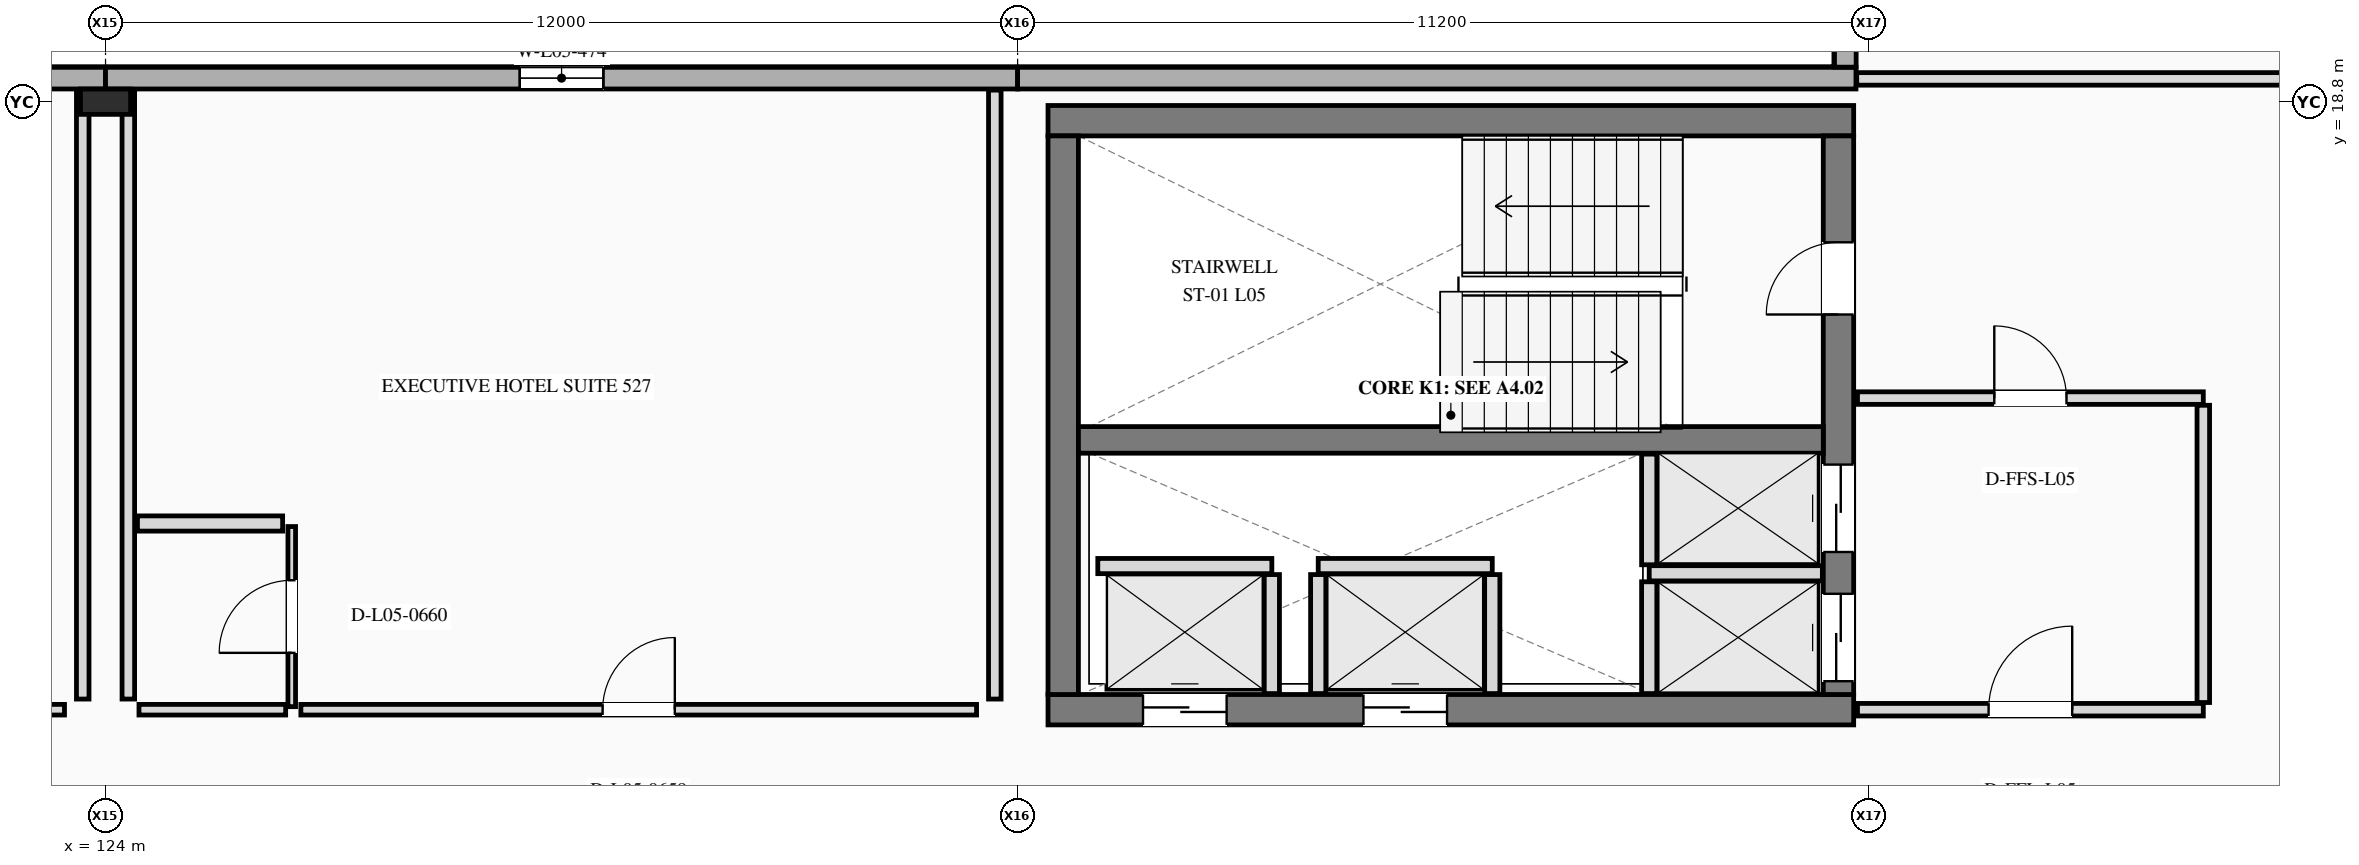
"""IFC4 building model, lengths in metres.
Left out: names, types, materials, properties, quantities, classifications, styles, units other than length and angle.
Written with IfcOpenShell. Run it as: python <this file> out.ifc"""

import sys

from ifc_helpers import new_model, si_unit, direction, frame, frame_2d, origin, origin_2d, place, context, subcontext, project, spatial, rectangle, i_section, extrude, element, fill, save


model = new_model("IFC4")
c1 = context("Model", 3, precision=1e-05, world=origin(), true_north=direction((0.0, 1.0)))
c2 = subcontext(c1, "Body", "Model", "MODEL_VIEW")
j1 = project(units=[si_unit("LENGTHUNIT", "METRE"), si_unit("PLANEANGLEUNIT", "RADIAN")], contexts=[c1])
p1 = place(None, origin())
s1 = spatial("IfcSite", under=j1, at=p1, CompositionType="ELEMENT")
p2 = place(p1, origin())
s2 = spatial("IfcBuilding", under=s1, at=p2, CompositionType="ELEMENT")
p3 = place(p2, frame((0.0, 0.0, 23.4)))
s3 = spatial("IfcBuildingStorey", under=s2, at=p3, CompositionType="ELEMENT", Elevation=23.4)
p4 = place(p3, frame((124.0, 18.8, 0.0), z_axis=(0.0, 0.0, 1.0), x_axis=(0.0, 1.0, 0.0)))
e1 = element("IfcColumn", 1, at=p4, inside=s3, PredefinedType="COLUMN", context=c2, shape_type="SweptSolid", body=[
    extrude(i_section(OverallWidth=0.333, OverallDepth=0.66, WebThickness=0.024, FlangeThickness=0.044, at=origin_2d()), origin(), (0.0, 0.0, 1.0), 3.6),
])
p5 = place(p3, frame((124.0, 19.11, 0.0), z_axis=(0.0, 0.0, 1.0), x_axis=(-1.0, 0.0, 0.0)))
e2 = element("IfcWall", 2, at=p5, inside=s3, PredefinedType="STANDARD", context=c2, shape_type="SweptSolid", body=[
    extrude(rectangle(XDim=12.0, YDim=0.285, at=frame_2d((6.0, 0.0))), origin(), (0.0, 0.0, 1.0), 3.6),
])
p6 = place(p5, frame((8.175, 0.0, 0.85)))
e3 = element("IfcOpeningElement", 3, at=p6, cuts=e2, PredefinedType="OPENING", context=c2, shape_type="SweptSolid", body=[
    extrude(rectangle(XDim=1.35, YDim=1.65, at=frame_2d((0.675, 0.825))), frame((0.0, 0.152, 0.0), z_axis=(0.0, -1.0, 0.0), x_axis=(1.0, 0.0, 0.0)), (0.0, 0.0, 1.0), 0.305),
])
p7 = place(p5, frame((2.55, 0.0, 0.85)))
e4 = element("IfcOpeningElement", 4, at=p7, cuts=e2, PredefinedType="OPENING", context=c2, shape_type="SweptSolid", body=[
    extrude(rectangle(XDim=1.2, YDim=1.6, at=frame_2d((0.6, 0.8))), frame((0.0, 0.152, 0.0), z_axis=(0.0, -1.0, 0.0), x_axis=(1.0, 0.0, 0.0)), (0.0, 0.0, 1.0), 0.305),
])
p8 = place(p3, frame((136.0, 19.11, 0.0), z_axis=(0.0, 0.0, 1.0), x_axis=(-1.0, 0.0, 0.0)))
e5 = element("IfcWall", 5, at=p8, inside=s3, PredefinedType="STANDARD", context=c2, shape_type="SweptSolid", body=[
    extrude(rectangle(XDim=12.0, YDim=0.285, at=frame_2d((6.0, 0.0))), origin(), (0.0, 0.0, 1.0), 3.6),
])
p9 = place(p8, frame((5.45, 0.0, 0.85)))
e6 = element("IfcOpeningElement", 6, at=p9, cuts=e5, PredefinedType="OPENING", context=c2, shape_type="SweptSolid", body=[
    extrude(rectangle(XDim=1.1, YDim=1.5, at=frame_2d((0.55, 0.75))), frame((0.0, 0.152, 0.0), z_axis=(0.0, -1.0, 0.0), x_axis=(1.0, 0.0, 0.0)), (0.0, 0.0, 1.0), 0.305),
])
p10 = place(p3, frame((147.03, 19.11, 0.0), z_axis=(0.0, 0.0, 1.0), x_axis=(-1.0, 0.0, 0.0)))
e7 = element("IfcWall", 7, at=p10, inside=s3, PredefinedType="STANDARD", context=c2, shape_type="SweptSolid", body=[
    extrude(rectangle(XDim=11.03, YDim=0.285, at=frame_2d((5.515, 0.0))), origin(), (0.0, 0.0, 1.0), 3.6),
])
p11 = place(p3, frame((146.89, 19.254, 0.0), z_axis=(0.0, 0.0, 1.0), x_axis=(0.0, 1.0, 0.0)))
e8 = element("IfcWall", 8, at=p11, inside=s3, PredefinedType="STANDARD", context=c2, shape_type="SweptSolid", body=[
    extrude(rectangle(XDim=5.546, YDim=0.285, at=frame_2d((2.773, 0.0))), origin(), (0.0, 0.0, 1.0), 3.6),
])
p12 = place(p11, frame((1.698, 0.0, 0.85)))
e9 = element("IfcOpeningElement", 9, at=p12, cuts=e8, PredefinedType="OPENING", context=c2, shape_type="SweptSolid", body=[
    extrude(rectangle(XDim=1.8, YDim=1.8, at=frame_2d((0.9, 0.9))), frame((0.0, 0.152, 0.0), z_axis=(0.0, -1.0, 0.0), x_axis=(1.0, 0.0, 0.0)), (0.0, 0.0, 1.0), 0.305),
])
p13 = place(p3, frame((136.4, 10.8, 0.0), z_axis=(0.0, 0.0, 1.0), x_axis=(1.0, 0.0, 0.0)))
e10 = element("IfcWall", 10, at=p13, inside=s3, PredefinedType="SHEAR", context=c2, shape_type="SweptSolid", body=[
    extrude(rectangle(XDim=10.6, YDim=0.4, at=frame_2d((5.3, 0.0))), origin(), (0.0, 0.0, 1.0), 3.6),
])
p14 = place(p13, frame((1.25, 0.0, 0.0)))
e11 = element("IfcOpeningElement", 11, at=p14, cuts=e10, PredefinedType="OPENING", context=c2, shape_type="SweptSolid", body=[
    extrude(rectangle(XDim=1.1, YDim=2.2, at=frame_2d((0.55, 1.1))), frame((0.0, 0.21, 0.0), z_axis=(0.0, -1.0, 0.0), x_axis=(1.0, 0.0, 0.0)), (0.0, 0.0, 1.0), 0.42),
])
p15 = place(p13, frame((4.15, 0.0, 0.0)))
e12 = element("IfcOpeningElement", 12, at=p15, cuts=e10, PredefinedType="OPENING", context=c2, shape_type="SweptSolid", body=[
    extrude(rectangle(XDim=1.1, YDim=2.2, at=frame_2d((0.55, 1.1))), frame((0.0, 0.21, 0.0), z_axis=(0.0, -1.0, 0.0), x_axis=(1.0, 0.0, 0.0)), (0.0, 0.0, 1.0), 0.42),
])
p16 = place(p3, frame((147.0, 18.55, 0.0), z_axis=(0.0, 0.0, 1.0), x_axis=(-1.0, 0.0, 0.0)))
e13 = element("IfcWall", 13, at=p16, inside=s3, PredefinedType="SHEAR", context=c2, shape_type="SweptSolid", body=[
    extrude(rectangle(XDim=10.6, YDim=0.4, at=frame_2d((5.3, 0.0))), origin(), (0.0, 0.0, 1.0), 3.6),
])
p17 = place(p3, frame((136.6, 18.35, 0.0), z_axis=(0.0, 0.0, 1.0), x_axis=(0.0, -1.0, 0.0)))
e14 = element("IfcWall", 14, at=p17, inside=s3, PredefinedType="SHEAR", context=c2, shape_type="SweptSolid", body=[
    extrude(rectangle(XDim=7.35, YDim=0.4, at=frame_2d((3.675, 0.0))), origin(), (0.0, 0.0, 1.0), 3.6),
])
p18 = place(p3, frame((146.8, 11.0, 0.0), z_axis=(0.0, 0.0, 1.0), x_axis=(0.0, 1.0, 0.0)))
e15 = element("IfcWall", 15, at=p18, inside=s3, PredefinedType="SHEAR", context=c2, shape_type="SweptSolid", body=[
    extrude(rectangle(XDim=7.35, YDim=0.4, at=frame_2d((3.675, 0.0))), origin(), (0.0, 0.0, 1.0), 3.6),
])
p19 = place(p18, frame((5.0, 0.0, 0.0)))
e16 = element("IfcOpeningElement", 16, at=p19, cuts=e15, PredefinedType="OPENING", context=c2, shape_type="SweptSolid", body=[
    extrude(rectangle(XDim=0.95, YDim=2.2, at=frame_2d((0.475, 1.1))), frame((0.0, 0.21, 0.0), z_axis=(0.0, -1.0, 0.0), x_axis=(1.0, 0.0, 0.0)), (0.0, 0.0, 1.0), 0.42),
])
p20 = place(p18, frame((0.175, 0.0, 0.0)))
e17 = element("IfcOpeningElement", 17, at=p20, cuts=e15, PredefinedType="OPENING", context=c2, shape_type="SweptSolid", body=[
    extrude(rectangle(XDim=1.15, YDim=2.25, at=frame_2d((0.575, 1.125))), frame((0.0, 0.21, 0.0), z_axis=(0.0, -1.0, 0.0), x_axis=(1.0, 0.0, 0.0)), (0.0, 0.0, 1.0), 0.42),
])
p21 = place(p18, frame((1.875, 0.0, 0.0)))
e18 = element("IfcOpeningElement", 18, at=p21, cuts=e15, PredefinedType="OPENING", context=c2, shape_type="SweptSolid", body=[
    extrude(rectangle(XDim=1.15, YDim=2.25, at=frame_2d((0.575, 1.125))), frame((0.0, 0.21, 0.0), z_axis=(0.0, -1.0, 0.0), x_axis=(1.0, 0.0, 0.0)), (0.0, 0.0, 1.0), 0.42),
])
p22 = place(p3, frame((136.8, 14.35, 0.0), z_axis=(0.0, 0.0, 1.0), x_axis=(1.0, 0.0, 0.0)))
e19 = element("IfcWall", 19, at=p22, inside=s3, PredefinedType="SHEAR", context=c2, shape_type="SweptSolid", body=[
    extrude(rectangle(XDim=9.8, YDim=0.35, at=frame_2d((4.9, 0.0))), origin(), (0.0, 0.0, 1.0), 3.6),
])
p23 = place(p3, frame((137.055, 12.69, 0.0), z_axis=(0.0, 0.0, 1.0), x_axis=(1.0, 0.0, 0.0)))
e20 = element("IfcWall", 20, at=p23, inside=s3, PredefinedType="PLUMBINGWALL", context=c2, shape_type="SweptSolid", body=[
    extrude(rectangle(XDim=2.29, YDim=0.2, at=frame_2d((1.145, 0.0))), origin(), (0.0, 0.0, 1.0), 3.3),
])
p24 = place(p3, frame((139.345, 11.012, 0.0), z_axis=(0.0, 0.0, 1.0), x_axis=(0.0, 1.0, 0.0)))
e21 = element("IfcWall", 21, at=p24, inside=s3, PredefinedType="PLUMBINGWALL", context=c2, shape_type="SweptSolid", body=[
    extrude(rectangle(XDim=1.566, YDim=0.2, at=frame_2d((0.783, 0.0))), origin(), (0.0, 0.0, 1.0), 3.3),
])
p25 = place(p3, frame((139.955, 12.69, 0.0), z_axis=(0.0, 0.0, 1.0), x_axis=(1.0, 0.0, 0.0)))
e22 = element("IfcWall", 22, at=p25, inside=s3, PredefinedType="PLUMBINGWALL", context=c2, shape_type="SweptSolid", body=[
    extrude(rectangle(XDim=2.29, YDim=0.2, at=frame_2d((1.145, 0.0))), origin(), (0.0, 0.0, 1.0), 3.3),
])
for number, where, z_axis, x_axis in (
    (23, (139.955, 11.012, 0.0), (0.0, 0.0, 1.0), (0.0, 1.0, 0.0)),
    (24, (142.245, 11.012, 0.0), (0.0, 0.0, 1.0), (0.0, 1.0, 0.0)),
):
    element("IfcWall", number, at=place(p3, frame(where, z_axis=z_axis, x_axis=x_axis)), inside=s3, PredefinedType="PLUMBINGWALL", context=c2, shape_type="SweptSolid", body=[
        extrude(rectangle(XDim=1.566, YDim=0.2, at=frame_2d((0.783, 0.0))), origin(), (0.0, 0.0, 1.0), 3.3),
    ])
p26 = place(p3, frame((144.31, 12.595, 0.0), z_axis=(0.0, 0.0, 1.0), x_axis=(1.0, 0.0, 0.0)))
e25 = element("IfcWall", 25, at=p26, inside=s3, PredefinedType="PLUMBINGWALL", context=c2, shape_type="SweptSolid", body=[
    extrude(rectangle(XDim=2.278, YDim=0.2, at=frame_2d((1.139, 0.0))), origin(), (0.0, 0.0, 1.0), 3.3),
])
p27 = place(p3, frame((144.31, 11.012, 0.0), z_axis=(0.0, 0.0, 1.0), x_axis=(0.0, 1.0, 0.0)))
e26 = element("IfcWall", 26, at=p27, inside=s3, PredefinedType="PLUMBINGWALL", context=c2, shape_type="SweptSolid", body=[
    extrude(rectangle(XDim=1.471, YDim=0.2, at=frame_2d((0.735, 0.0))), origin(), (0.0, 0.0, 1.0), 3.3),
])
p28 = place(p3, frame((144.31, 12.707, 0.0), z_axis=(0.0, 0.0, 1.0), x_axis=(0.0, 1.0, 0.0)))
e27 = element("IfcWall", 27, at=p28, inside=s3, PredefinedType="PLUMBINGWALL", context=c2, shape_type="SweptSolid", body=[
    extrude(rectangle(XDim=1.456, YDim=0.2, at=frame_2d((0.728, 0.0))), origin(), (0.0, 0.0, 1.0), 3.3),
])
p29 = place(p3, frame((147.05, 10.8, 0.0), z_axis=(0.0, 0.0, 1.0), x_axis=(1.0, 0.0, 0.0)))
e28 = element("IfcWall", 28, at=p29, inside=s3, PredefinedType="PARTITIONING", context=c2, shape_type="SweptSolid", body=[
    extrude(rectangle(XDim=4.55, YDim=0.165, at=frame_2d((2.275, 0.0))), origin(), (0.0, 0.0, 1.0), 3.3),
])
p30 = place(p29, frame((1.725, 0.0, 0.0)))
e29 = element("IfcOpeningElement", 29, at=p30, cuts=e28, PredefinedType="OPENING", context=c2, shape_type="SweptSolid", body=[
    extrude(rectangle(XDim=1.1, YDim=2.2, at=frame_2d((0.55, 1.1))), frame((0.0, 0.093, 0.0), z_axis=(0.0, -1.0, 0.0), x_axis=(1.0, 0.0, 0.0)), (0.0, 0.0, 1.0), 0.185),
])
p31 = place(p3, frame((147.05, 14.9, 0.0), z_axis=(0.0, 0.0, 1.0), x_axis=(1.0, 0.0, 0.0)))
e30 = element("IfcWall", 30, at=p31, inside=s3, PredefinedType="PARTITIONING", context=c2, shape_type="SweptSolid", body=[
    extrude(rectangle(XDim=4.55, YDim=0.165, at=frame_2d((2.275, 0.0))), origin(), (0.0, 0.0, 1.0), 3.3),
])
p32 = place(p31, frame((1.8, 0.0, 0.0)))
e31 = element("IfcOpeningElement", 31, at=p32, cuts=e30, PredefinedType="OPENING", context=c2, shape_type="SweptSolid", body=[
    extrude(rectangle(XDim=0.95, YDim=2.2, at=frame_2d((0.475, 1.1))), frame((0.0, 0.093, 0.0), z_axis=(0.0, -1.0, 0.0), x_axis=(1.0, 0.0, 0.0)), (0.0, 0.0, 1.0), 0.185),
])
p33 = place(p3, frame((151.6, 10.895, 0.0), z_axis=(0.0, 0.0, 1.0), x_axis=(0.0, 1.0, 0.0)))
e32 = element("IfcWall", 32, at=p33, inside=s3, PredefinedType="PARTITIONING", context=c2, shape_type="SweptSolid", body=[
    extrude(rectangle(XDim=3.911, YDim=0.165, at=frame_2d((1.956, 0.0))), origin(), (0.0, 0.0, 1.0), 3.3),
])
p34 = place(p3, frame((120.27, 10.8, 0.0), z_axis=(0.0, 0.0, 1.0), x_axis=(1.0, 0.0, 0.0)))
e33 = element("IfcWall", 33, at=p34, inside=s3, PredefinedType="PARTITIONING", context=c2, shape_type="SweptSolid", body=[
    extrude(rectangle(XDim=3.19, YDim=0.14, at=frame_2d((1.595, 0.0))), origin(), (0.0, 0.0, 1.0), 3.3),
])
p35 = place(p34, frame((1.075, 0.0, 0.0)))
e34 = element("IfcOpeningElement", 34, at=p35, cuts=e33, PredefinedType="OPENING", context=c2, shape_type="SweptSolid", body=[
    extrude(rectangle(XDim=1.04, YDim=2.25, at=frame_2d((0.52, 1.125))), frame((0.0, 0.08, 0.0), z_axis=(0.0, -1.0, 0.0), x_axis=(1.0, 0.0, 0.0)), (0.0, 0.0, 1.0), 0.16),
])
p36 = place(p3, frame((123.7, 10.94, 0.0), z_axis=(0.0, 0.0, 1.0), x_axis=(0.0, 1.0, 0.0)))
e35 = element("IfcWall", 35, at=p36, inside=s3, PredefinedType="PARTITIONING", context=c2, shape_type="SweptSolid", body=[
    extrude(rectangle(XDim=8.012, YDim=0.165, at=frame_2d((4.006, 0.0))), origin(), (0.0, 0.0, 1.0), 2.538),
])
p37 = place(p3, frame((124.44, 10.8, 0.0), z_axis=(0.0, 0.0, 1.0), x_axis=(1.0, 0.0, 0.0)))
e36 = element("IfcWall", 36, at=p37, inside=s3, PredefinedType="PARTITIONING", context=c2, shape_type="SweptSolid", body=[
    extrude(rectangle(XDim=1.93, YDim=0.14, at=frame_2d((0.965, 0.0))), origin(), (0.0, 0.0, 1.0), 3.3),
])
p38 = place(p3, frame((126.57, 10.8, 0.0), z_axis=(0.0, 0.0, 1.0), x_axis=(1.0, 0.0, 0.0)))
e37 = element("IfcWall", 37, at=p38, inside=s3, PredefinedType="PARTITIONING", context=c2, shape_type="SweptSolid", body=[
    extrude(rectangle(XDim=8.89, YDim=0.14, at=frame_2d((4.445, 0.0))), origin(), (0.0, 0.0, 1.0), 3.3),
])
p39 = place(p38, frame((3.97, 0.0, 0.0)))
e38 = element("IfcOpeningElement", 38, at=p39, cuts=e37, PredefinedType="OPENING", context=c2, shape_type="SweptSolid", body=[
    extrude(rectangle(XDim=0.95, YDim=2.3, at=frame_2d((0.475, 1.15))), frame((0.0, 0.08, 0.0), z_axis=(0.0, -1.0, 0.0), x_axis=(1.0, 0.0, 0.0)), (0.0, 0.0, 1.0), 0.16),
])
p40 = place(p3, frame((124.3, 10.94, 0.0), z_axis=(0.0, 0.0, 1.0), x_axis=(0.0, 1.0, 0.0)))
e39 = element("IfcWall", 39, at=p40, inside=s3, PredefinedType="PARTITIONING", context=c2, shape_type="SweptSolid", body=[
    extrude(rectangle(XDim=8.012, YDim=0.165, at=frame_2d((4.006, 0.0))), origin(), (0.0, 0.0, 1.0), 2.629),
])
p41 = place(p3, frame((135.7, 10.94, 0.0), z_axis=(0.0, 0.0, 1.0), x_axis=(0.0, 1.0, 0.0)))
e40 = element("IfcWall", 40, at=p41, inside=s3, PredefinedType="PARTITIONING", context=c2, shape_type="SweptSolid", body=[
    extrude(rectangle(XDim=8.012, YDim=0.165, at=frame_2d((4.006, 0.0))), origin(), (0.0, 0.0, 1.0), 3.3),
])
p42 = place(p3, frame((126.45, 10.84, 0.0), z_axis=(0.0, 0.0, 1.0), x_axis=(0.0, 1.0, 0.0)))
e41 = element("IfcWall", 41, at=p42, inside=s3, PredefinedType="PARTITIONING", context=c2, shape_type="SweptSolid", body=[
    extrude(rectangle(XDim=2.37, YDim=0.1, at=frame_2d((1.185, 0.0))), origin(), (0.0, 0.0, 1.0), 3.3),
])
p43 = place(p42, frame((0.708, 0.0, 0.0)))
e42 = element("IfcOpeningElement", 42, at=p43, cuts=e41, PredefinedType="OPENING", context=c2, shape_type="SweptSolid", body=[
    extrude(rectangle(XDim=0.955, YDim=2.22, at=frame_2d((0.478, 1.11))), frame((0.0, 0.06, 0.0), z_axis=(0.0, -1.0, 0.0), x_axis=(1.0, 0.0, 0.0)), (0.0, 0.0, 1.0), 0.12),
])
p44 = place(p3, frame((124.42, 13.25, 0.0), z_axis=(0.0, 0.0, 1.0), x_axis=(1.0, 0.0, 0.0)))
e43 = element("IfcWall", 43, at=p44, inside=s3, PredefinedType="PLUMBINGWALL", context=c2, shape_type="SweptSolid", body=[
    extrude(rectangle(XDim=1.91, YDim=0.2, at=frame_2d((0.955, 0.0))), origin(), (0.0, 0.0, 1.0), 3.3),
])
p45 = place(p3, frame((147.04, 19.1, 0.0), z_axis=(0.0, 0.0, 1.0), x_axis=(1.0, 0.0, 0.0)))
e44 = element("IfcWall", 44, at=p45, inside=s3, PredefinedType="PARTITIONING", context=c2, shape_type="SweptSolid", body=[
    extrude(rectangle(XDim=8.22, YDim=0.165, at=frame_2d((4.11, 0.0))), origin(), (0.0, 0.0, 1.0), 3.3),
])
p46 = place(p9, origin())
e45 = element("IfcWindow", 45, at=p46, inside=s3, PartitioningType="SINGLE_PANEL", PredefinedType="WINDOW", context=c2, shape_type="SweptSolid", body=[
    extrude(rectangle(XDim=1.1, YDim=1.5, at=frame_2d((0.55, 0.75))), frame((0.0, 0.03, 0.0), z_axis=(0.0, -1.0, 0.0), x_axis=(1.0, 0.0, 0.0)), (0.0, 0.0, 1.0), 0.06),
])
fill(e6, e45)
p47 = place(p19, origin())
e46 = element("IfcDoor", 46, at=p47, inside=s3, OperationType="SINGLE_SWING_LEFT", PredefinedType="DOOR", context=c2, shape_type="SweptSolid", body=[
    extrude(rectangle(XDim=0.95, YDim=2.2, at=frame_2d((0.475, 1.1))), frame((0.0, 0.025, 0.0), z_axis=(0.0, -1.0, 0.0), x_axis=(1.0, 0.0, 0.0)), (0.0, 0.0, 1.0), 0.05),
])
fill(e16, e46)
p48 = place(p14, origin())
e47 = element("IfcDoor", 47, at=p48, inside=s3, OperationType="SLIDING_TO_LEFT", PredefinedType="DOOR", context=c2, shape_type="SweptSolid", body=[
    extrude(rectangle(XDim=1.1, YDim=2.2, at=frame_2d((0.55, 1.1))), frame((0.0, 0.025, 0.0), z_axis=(0.0, -1.0, 0.0), x_axis=(1.0, 0.0, 0.0)), (0.0, 0.0, 1.0), 0.05),
])
fill(e11, e47)
p49 = place(p15, origin())
e48 = element("IfcDoor", 48, at=p49, inside=s3, OperationType="SLIDING_TO_RIGHT", PredefinedType="DOOR", context=c2, shape_type="SweptSolid", body=[
    extrude(rectangle(XDim=1.1, YDim=2.2, at=frame_2d((0.55, 1.1))), frame((0.0, 0.025, 0.0), z_axis=(0.0, -1.0, 0.0), x_axis=(1.0, 0.0, 0.0)), (0.0, 0.0, 1.0), 0.05),
])
fill(e12, e48)
p50 = place(p20, origin())
e49 = element("IfcDoor", 49, at=p50, inside=s3, OperationType="SLIDING_TO_LEFT", PredefinedType="DOOR", context=c2, shape_type="SweptSolid", body=[
    extrude(rectangle(XDim=1.15, YDim=2.25, at=frame_2d((0.575, 1.125))), frame((0.0, 0.025, 0.0), z_axis=(0.0, -1.0, 0.0), x_axis=(1.0, 0.0, 0.0)), (0.0, 0.0, 1.0), 0.05),
])
fill(e17, e49)
p51 = place(p21, origin())
e50 = element("IfcDoor", 50, at=p51, inside=s3, OperationType="SLIDING_TO_RIGHT", PredefinedType="DOOR", context=c2, shape_type="SweptSolid", body=[
    extrude(rectangle(XDim=1.15, YDim=2.25, at=frame_2d((0.575, 1.125))), frame((0.0, 0.025, 0.0), z_axis=(0.0, -1.0, 0.0), x_axis=(1.0, 0.0, 0.0)), (0.0, 0.0, 1.0), 0.05),
])
fill(e18, e50)
p52 = place(p30, origin())
e51 = element("IfcDoor", 51, at=p52, inside=s3, OperationType="SINGLE_SWING_RIGHT", PredefinedType="DOOR", context=c2, shape_type="SweptSolid", body=[
    extrude(rectangle(XDim=1.1, YDim=2.2, at=frame_2d((0.55, 1.1))), frame((0.0, 0.025, 0.0), z_axis=(0.0, -1.0, 0.0), x_axis=(1.0, 0.0, 0.0)), (0.0, 0.0, 1.0), 0.05),
])
fill(e29, e51)
p53 = place(p32, origin())
e52 = element("IfcDoor", 52, at=p53, inside=s3, OperationType="SINGLE_SWING_LEFT", PredefinedType="DOOR", context=c2, shape_type="SweptSolid", body=[
    extrude(rectangle(XDim=0.95, YDim=2.2, at=frame_2d((0.475, 1.1))), frame((0.0, 0.025, 0.0), z_axis=(0.0, -1.0, 0.0), x_axis=(1.0, 0.0, 0.0)), (0.0, 0.0, 1.0), 0.05),
])
fill(e31, e52)
p54 = place(p39, origin())
e53 = element("IfcDoor", 53, at=p54, inside=s3, OperationType="SINGLE_SWING_RIGHT", PredefinedType="DOOR", context=c2, shape_type="SweptSolid", body=[
    extrude(rectangle(XDim=0.95, YDim=2.3, at=frame_2d((0.475, 1.15))), frame((0.0, 0.025, 0.0), z_axis=(0.0, -1.0, 0.0), x_axis=(1.0, 0.0, 0.0)), (0.0, 0.0, 1.0), 0.05),
])
fill(e38, e53)
p55 = place(p43, origin())
e54 = element("IfcDoor", 54, at=p55, inside=s3, OperationType="SINGLE_SWING_LEFT", PredefinedType="DOOR", context=c2, shape_type="SweptSolid", body=[
    extrude(rectangle(XDim=0.955, YDim=2.22, at=frame_2d((0.478, 1.11))), frame((0.0, 0.025, 0.0), z_axis=(0.0, -1.0, 0.0), x_axis=(1.0, 0.0, 0.0)), (0.0, 0.0, 1.0), 0.05),
])
fill(e42, e54)
save(model, sys.argv[1])
